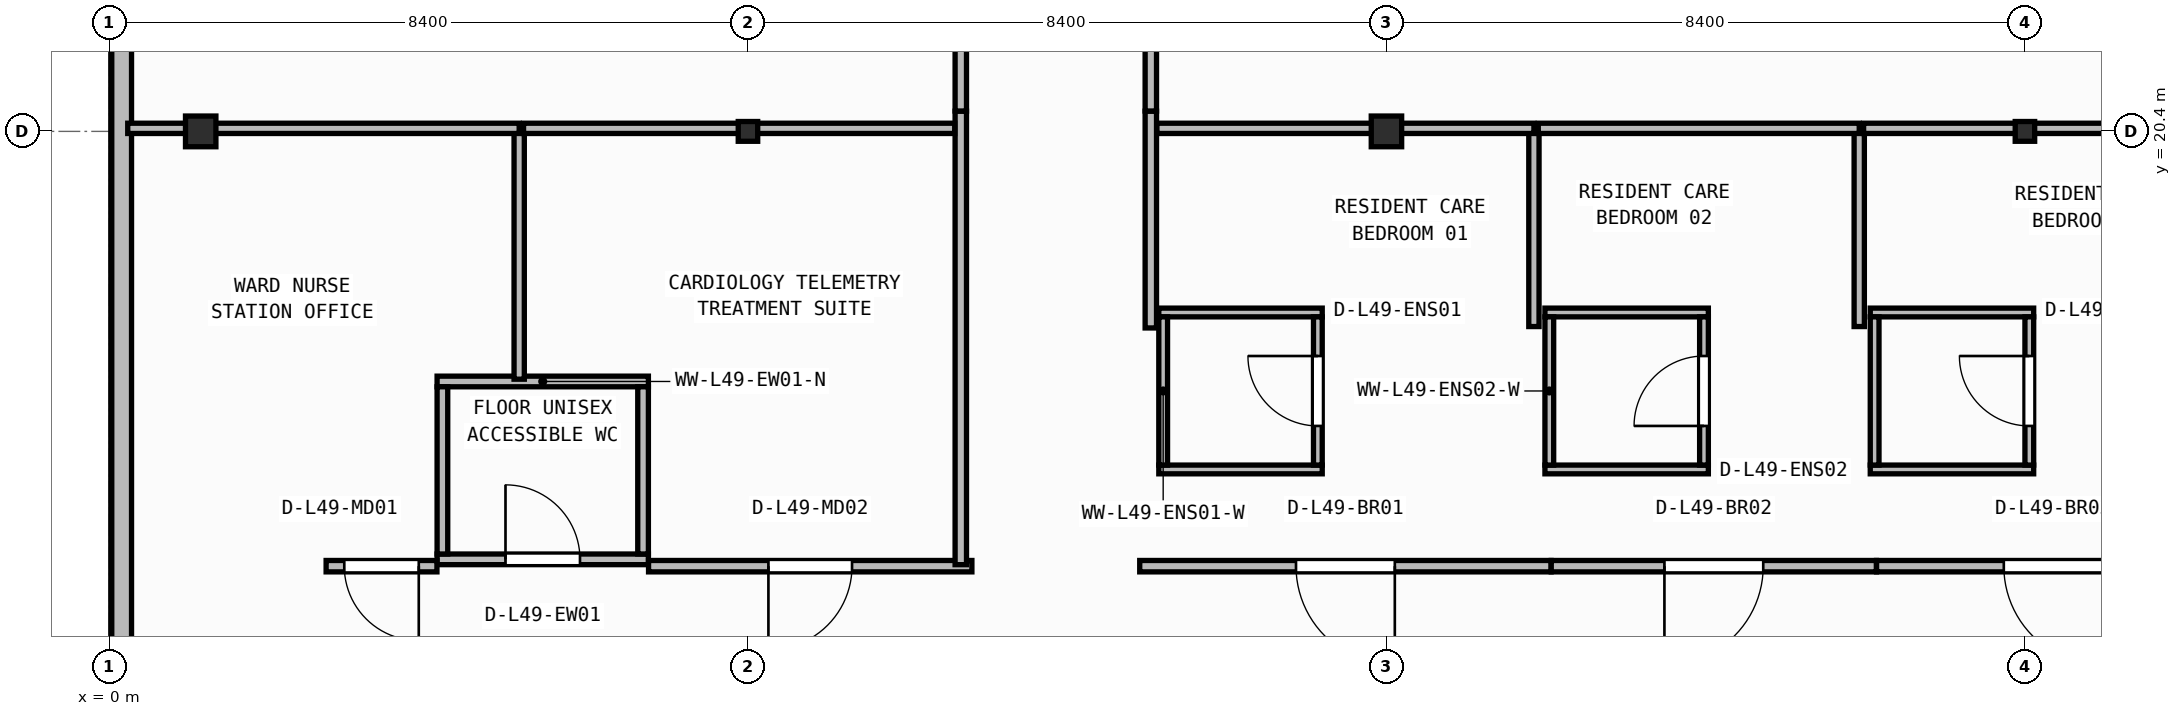
"""IFC4 building model, lengths in metres.
Left out: names, types, materials, properties, quantities, classifications, styles, units other than length and angle.
Written with IfcOpenShell. Run it as: python <this file> out.ifc"""

import sys

from ifc_helpers import new_model, si_unit, direction, frame, frame_2d, origin, origin_2d, place, context, subcontext, project, spatial, rectangle, i_section, extrude, element, fill, save


model = new_model("IFC4")
c1 = context("Model", 3, precision=1e-05, world=origin(), true_north=direction((0.0, 1.0)))
c2 = subcontext(c1, "Body", "Model", "MODEL_VIEW")
j1 = project(units=[si_unit("LENGTHUNIT", "METRE"), si_unit("PLANEANGLEUNIT", "RADIAN")], contexts=[c1])
p1 = place(None, origin())
s1 = spatial("IfcSite", under=j1, at=p1, CompositionType="ELEMENT")
p2 = place(p1, origin())
s2 = spatial("IfcBuilding", under=s1, at=p2, CompositionType="ELEMENT")
p3 = place(p2, frame((0.0, 0.0, 200.0)))
s3 = spatial("IfcBuildingStorey", under=s2, at=p3, CompositionType="ELEMENT", Elevation=200.0)
p4 = place(p3, frame((1.2, 20.4, 0.0), z_axis=(0.0, 0.0, 1.0), x_axis=(1.0, 0.0, 0.0)))
e1 = element("IfcColumn", 1, at=p4, inside=s3, PredefinedType="COLUMN", context=c2, shape_type="SweptSolid", body=[
    extrude(i_section(OverallWidth=0.4, OverallDepth=0.404, WebThickness=0.02, FlangeThickness=0.032, at=origin_2d()), origin(), (0.0, 0.0, 1.0), 3.95),
])
p5 = place(p3, frame((8.4, 20.4, 0.0), z_axis=(0.0, 0.0, 1.0), x_axis=(1.0, 0.0, 0.0)))
e2 = element("IfcColumn", 2, at=p5, inside=s3, PredefinedType="COLUMN", context=c2, shape_type="SweptSolid", body=[
    extrude(i_section(OverallWidth=0.256, OverallDepth=0.26, WebThickness=0.01, FlangeThickness=0.017, FilletRadius=0.013, at=origin_2d()), origin(), (0.0, 0.0, 1.0), 3.95),
])
p6 = place(p3, frame((16.8, 20.4, 0.0), z_axis=(0.0, 0.0, 1.0), x_axis=(1.0, 0.0, 0.0)))
e3 = element("IfcColumn", 3, at=p6, inside=s3, PredefinedType="COLUMN", context=c2, shape_type="SweptSolid", body=[
    extrude(i_section(OverallWidth=0.4, OverallDepth=0.404, WebThickness=0.02, FlangeThickness=0.032, at=origin_2d()), origin(), (0.0, 0.0, 1.0), 3.95),
])
p7 = place(p3, frame((25.2, 20.4, 0.0), z_axis=(0.0, 0.0, 1.0), x_axis=(1.0, 0.0, 0.0)))
e4 = element("IfcColumn", 4, at=p7, inside=s3, PredefinedType="COLUMN", context=c2, shape_type="SweptSolid", body=[
    extrude(i_section(OverallWidth=0.256, OverallDepth=0.26, WebThickness=0.01, FlangeThickness=0.017, FilletRadius=0.013, at=origin_2d()), origin(), (0.0, 0.0, 1.0), 3.95),
])
p8 = place(p3, frame((0.16, 40.14, 0.0), z_axis=(0.0, 0.0, 1.0), x_axis=(0.0, -1.0, 0.0)))
e5 = element("IfcWall", 5, at=p8, inside=s3, PredefinedType="STANDARD", context=c2, shape_type="SweptSolid", body=[
    extrude(rectangle(XDim=37.48, YDim=0.26, at=frame_2d((18.74, 0.0))), origin(), (0.0, 0.0, 1.0), 3.71),
])
p9 = place(p8, frame((27.4, 0.0, 0.9)))
e6 = element("IfcOpeningElement", 6, at=p9, cuts=e5, PredefinedType="OPENING", context=c2, shape_type="SweptSolid", body=[
    extrude(rectangle(XDim=2.4, YDim=1.65, at=frame_2d((1.2, 0.825))), frame((0.0, 0.14, 0.0), z_axis=(0.0, -1.0, 0.0), x_axis=(1.0, 0.0, 0.0)), (0.0, 0.0, 1.0), 0.28),
])
p10 = place(p3, frame((4.31, 14.77, 0.0), z_axis=(0.0, 0.0, 1.0), x_axis=(1.0, 0.0, 0.0)))
e7 = element("IfcWall", 7, at=p10, inside=s3, PredefinedType="PARTITIONING", context=c2, shape_type="SweptSolid", body=[
    extrude(rectangle(XDim=2.78, YDim=0.14, at=frame_2d((1.39, 0.0))), origin(), (0.0, 0.0, 1.0), 3.71),
])
p11 = place(p10, frame((0.9, 0.0, 0.0)))
e8 = element("IfcOpeningElement", 8, at=p11, cuts=e7, PredefinedType="OPENING", context=c2, shape_type="SweptSolid", body=[
    extrude(rectangle(XDim=0.98, YDim=2.1, at=frame_2d((0.49, 1.05))), frame((0.0, 0.08, 0.0), z_axis=(0.0, -1.0, 0.0), x_axis=(1.0, 0.0, 0.0)), (0.0, 0.0, 1.0), 0.16),
])
p12 = place(p3, frame((4.31, 17.11, 0.0), z_axis=(0.0, 0.0, 1.0), x_axis=(1.0, 0.0, 0.0)))
e9 = element("IfcWall", 9, at=p12, inside=s3, PredefinedType="PARTITIONING", context=c2, shape_type="SweptSolid", body=[
    extrude(rectangle(XDim=2.78, YDim=0.14, at=frame_2d((1.39, 0.0))), origin(), (0.0, 0.0, 1.0), 3.71),
])
for number, where, z_axis, x_axis in (
    (10, (4.38, 14.84, 0.0), (0.0, 0.0, 1.0), (0.0, 1.0, 0.0)),
    (11, (7.02, 14.84, 0.0), (0.0, 0.0, 1.0), (0.0, 1.0, 0.0)),
):
    element("IfcWall", number, at=place(p3, frame(where, z_axis=z_axis, x_axis=x_axis)), inside=s3, PredefinedType="PARTITIONING", context=c2, shape_type="SweptSolid", body=[
        extrude(rectangle(XDim=2.2, YDim=0.14, at=frame_2d((1.1, 0.0))), origin(), (0.0, 0.0, 1.0), 3.71),
    ])
for number, where, z_axis, x_axis in (
    (12, (13.805, 15.952, 0.0), (0.0, 0.0, 1.0), (1.0, 0.0, 0.0)),
    (13, (13.805, 18.018, 0.0), (0.0, 0.0, 1.0), (1.0, 0.0, 0.0)),
):
    element("IfcWall", number, at=place(p3, frame(where, z_axis=z_axis, x_axis=x_axis)), inside=s3, PredefinedType="PARTITIONING", context=c2, shape_type="SweptSolid", body=[
        extrude(rectangle(XDim=2.15, YDim=0.115, at=frame_2d((1.075, 0.0))), origin(), (0.0, 0.0, 1.0), 3.71),
    ])
p13 = place(p3, frame((13.863, 16.01, 0.0), z_axis=(0.0, 0.0, 1.0), x_axis=(0.0, 1.0, 0.0)))
e14 = element("IfcWall", 14, at=p13, inside=s3, PredefinedType="PARTITIONING", context=c2, shape_type="SweptSolid", body=[
    extrude(rectangle(XDim=1.95, YDim=0.115, at=frame_2d((0.975, 0.0))), origin(), (0.0, 0.0, 1.0), 3.71),
])
p14 = place(p3, frame((15.897, 16.01, 0.0), z_axis=(0.0, 0.0, 1.0), x_axis=(0.0, 1.0, 0.0)))
e15 = element("IfcWall", 15, at=p14, inside=s3, PredefinedType="PARTITIONING", context=c2, shape_type="SweptSolid", body=[
    extrude(rectangle(XDim=1.95, YDim=0.115, at=frame_2d((0.975, 0.0))), origin(), (0.0, 0.0, 1.0), 3.71),
])
p15 = place(p14, frame((0.515, 0.0, 0.0)))
e16 = element("IfcOpeningElement", 16, at=p15, cuts=e15, PredefinedType="OPENING", context=c2, shape_type="SweptSolid", body=[
    extrude(rectangle(XDim=0.92, YDim=2.1, at=frame_2d((0.46, 1.05))), frame((0.0, 0.067, 0.0), z_axis=(0.0, -1.0, 0.0), x_axis=(1.0, 0.0, 0.0)), (0.0, 0.0, 1.0), 0.135),
])
for number, where, z_axis, x_axis in (
    (17, (18.885, 15.952, 0.0), (0.0, 0.0, 1.0), (1.0, 0.0, 0.0)),
    (18, (18.885, 18.018, 0.0), (0.0, 0.0, 1.0), (1.0, 0.0, 0.0)),
):
    element("IfcWall", number, at=place(p3, frame(where, z_axis=z_axis, x_axis=x_axis)), inside=s3, PredefinedType="PARTITIONING", context=c2, shape_type="SweptSolid", body=[
        extrude(rectangle(XDim=2.15, YDim=0.115, at=frame_2d((1.075, 0.0))), origin(), (0.0, 0.0, 1.0), 3.71),
    ])
p16 = place(p3, frame((18.942, 16.01, 0.0), z_axis=(0.0, 0.0, 1.0), x_axis=(0.0, 1.0, 0.0)))
e19 = element("IfcWall", 19, at=p16, inside=s3, PredefinedType="PARTITIONING", context=c2, shape_type="SweptSolid", body=[
    extrude(rectangle(XDim=1.95, YDim=0.115, at=frame_2d((0.975, 0.0))), origin(), (0.0, 0.0, 1.0), 3.71),
])
p17 = place(p3, frame((20.978, 16.01, 0.0), z_axis=(0.0, 0.0, 1.0), x_axis=(0.0, 1.0, 0.0)))
e20 = element("IfcWall", 20, at=p17, inside=s3, PredefinedType="PARTITIONING", context=c2, shape_type="SweptSolid", body=[
    extrude(rectangle(XDim=1.95, YDim=0.115, at=frame_2d((0.975, 0.0))), origin(), (0.0, 0.0, 1.0), 3.71),
])
p18 = place(p17, frame((0.515, 0.0, 0.0)))
e21 = element("IfcOpeningElement", 21, at=p18, cuts=e20, PredefinedType="OPENING", context=c2, shape_type="SweptSolid", body=[
    extrude(rectangle(XDim=0.92, YDim=2.1, at=frame_2d((0.46, 1.05))), frame((0.0, 0.067, 0.0), z_axis=(0.0, -1.0, 0.0), x_axis=(1.0, 0.0, 0.0)), (0.0, 0.0, 1.0), 0.135),
])
p19 = place(p3, frame((23.165, 15.952, 0.0), z_axis=(0.0, 0.0, 1.0), x_axis=(1.0, 0.0, 0.0)))
e22 = element("IfcWall", 22, at=p19, inside=s3, PredefinedType="PARTITIONING", context=c2, shape_type="SweptSolid", body=[
    extrude(rectangle(XDim=2.15, YDim=0.115, at=frame_2d((1.075, 0.0))), origin(), (0.0, 0.0, 1.0), 3.429),
])
p20 = place(p3, frame((23.165, 18.018, 0.0), z_axis=(0.0, 0.0, 1.0), x_axis=(1.0, 0.0, 0.0)))
e23 = element("IfcWall", 23, at=p20, inside=s3, PredefinedType="PARTITIONING", context=c2, shape_type="SweptSolid", body=[
    extrude(rectangle(XDim=2.15, YDim=0.115, at=frame_2d((1.075, 0.0))), origin(), (0.0, 0.0, 1.0), 3.71),
])
p21 = place(p3, frame((23.222, 16.01, 0.0), z_axis=(0.0, 0.0, 1.0), x_axis=(0.0, 1.0, 0.0)))
e24 = element("IfcWall", 24, at=p21, inside=s3, PredefinedType="PARTITIONING", context=c2, shape_type="SweptSolid", body=[
    extrude(rectangle(XDim=1.95, YDim=0.115, at=frame_2d((0.975, 0.0))), origin(), (0.0, 0.0, 1.0), 3.71),
])
p22 = place(p3, frame((25.258, 16.01, 0.0), z_axis=(0.0, 0.0, 1.0), x_axis=(0.0, 1.0, 0.0)))
e25 = element("IfcWall", 25, at=p22, inside=s3, PredefinedType="PARTITIONING", context=c2, shape_type="SweptSolid", body=[
    extrude(rectangle(XDim=1.95, YDim=0.115, at=frame_2d((0.975, 0.0))), origin(), (0.0, 0.0, 1.0), 3.157),
])
p23 = place(p22, frame((0.515, 0.0, 0.0)))
e26 = element("IfcOpeningElement", 26, at=p23, cuts=e25, PredefinedType="OPENING", context=c2, shape_type="SweptSolid", body=[
    extrude(rectangle(XDim=0.92, YDim=2.1, at=frame_2d((0.46, 1.05))), frame((0.0, 0.067, 0.0), z_axis=(0.0, -1.0, 0.0), x_axis=(1.0, 0.0, 0.0)), (0.0, 0.0, 1.0), 0.135),
])
p24 = place(p3, frame((4.308, 14.68, 0.0), z_axis=(0.0, 0.0, 1.0), x_axis=(-1.0, 0.0, 0.0)))
e27 = element("IfcWall", 27, at=p24, inside=s3, PredefinedType="PARTITIONING", context=c2, shape_type="SweptSolid", body=[
    extrude(rectangle(XDim=1.458, YDim=0.15, at=frame_2d((0.729, 0.0))), origin(), (0.0, 0.0, 1.0), 3.71),
])
p25 = place(p24, frame((0.239, 0.0, 0.0)))
e28 = element("IfcOpeningElement", 28, at=p25, cuts=e27, PredefinedType="OPENING", context=c2, shape_type="SweptSolid", body=[
    extrude(rectangle(XDim=0.98, YDim=2.1, at=frame_2d((0.49, 1.05))), frame((0.0, 0.085, 0.0), z_axis=(0.0, -1.0, 0.0), x_axis=(1.0, 0.0, 0.0)), (0.0, 0.0, 1.0), 0.17),
])
p26 = place(p3, frame((11.346, 14.68, 0.0), z_axis=(0.0, 0.0, 1.0), x_axis=(-1.0, 0.0, 0.0)))
e29 = element("IfcWall", 29, at=p26, inside=s3, PredefinedType="PARTITIONING", context=c2, shape_type="SweptSolid", body=[
    extrude(rectangle(XDim=4.254, YDim=0.15, at=frame_2d((2.127, 0.0))), origin(), (0.0, 0.0, 1.0), 3.71),
])
p27 = place(p26, frame((1.577, 0.0, 0.0)))
e30 = element("IfcOpeningElement", 30, at=p27, cuts=e29, PredefinedType="OPENING", context=c2, shape_type="SweptSolid", body=[
    extrude(rectangle(XDim=1.1, YDim=2.1, at=frame_2d((0.55, 1.05))), frame((0.0, 0.085, 0.0), z_axis=(0.0, -1.0, 0.0), x_axis=(1.0, 0.0, 0.0)), (0.0, 0.0, 1.0), 0.17),
])
p28 = place(p3, frame((18.966, 14.68, 0.0), z_axis=(0.0, 0.0, 1.0), x_axis=(-1.0, 0.0, 0.0)))
e31 = element("IfcWall", 31, at=p28, inside=s3, PredefinedType="PARTITIONING", context=c2, shape_type="SweptSolid", body=[
    extrude(rectangle(XDim=5.412, YDim=0.15, at=frame_2d((2.706, 0.0))), origin(), (0.0, 0.0, 1.0), 3.71),
])
p29 = place(p28, frame((2.056, 0.0, 0.0)))
e32 = element("IfcOpeningElement", 32, at=p29, cuts=e31, PredefinedType="OPENING", context=c2, shape_type="SweptSolid", body=[
    extrude(rectangle(XDim=1.3, YDim=2.15, at=frame_2d((0.65, 1.075))), frame((0.0, 0.085, 0.0), z_axis=(0.0, -1.0, 0.0), x_axis=(1.0, 0.0, 0.0)), (0.0, 0.0, 1.0), 0.17),
])
p30 = place(p3, frame((23.246, 14.68, 0.0), z_axis=(0.0, 0.0, 1.0), x_axis=(-1.0, 0.0, 0.0)))
e33 = element("IfcWall", 33, at=p30, inside=s3, PredefinedType="PARTITIONING", context=c2, shape_type="SweptSolid", body=[
    extrude(rectangle(XDim=4.278, YDim=0.15, at=frame_2d((2.139, 0.0))), origin(), (0.0, 0.0, 1.0), 3.71),
])
p31 = place(p30, frame((1.489, 0.0, 0.0)))
e34 = element("IfcOpeningElement", 34, at=p31, cuts=e33, PredefinedType="OPENING", context=c2, shape_type="SweptSolid", body=[
    extrude(rectangle(XDim=1.3, YDim=2.15, at=frame_2d((0.65, 1.075))), frame((0.0, 0.085, 0.0), z_axis=(0.0, -1.0, 0.0), x_axis=(1.0, 0.0, 0.0)), (0.0, 0.0, 1.0), 0.17),
])
p32 = place(p3, frame((27.896, 14.68, 0.0), z_axis=(0.0, 0.0, 1.0), x_axis=(-1.0, 0.0, 0.0)))
e35 = element("IfcWall", 35, at=p32, inside=s3, PredefinedType="PARTITIONING", context=c2, shape_type="SweptSolid", body=[
    extrude(rectangle(XDim=4.648, YDim=0.15, at=frame_2d((2.324, 0.0))), origin(), (0.0, 0.0, 1.0), 3.71),
])
p33 = place(p32, frame((1.674, 0.0, 0.0)))
e36 = element("IfcOpeningElement", 36, at=p33, cuts=e35, PredefinedType="OPENING", context=c2, shape_type="SweptSolid", body=[
    extrude(rectangle(XDim=1.3, YDim=2.15, at=frame_2d((0.65, 1.075))), frame((0.0, 0.085, 0.0), z_axis=(0.0, -1.0, 0.0), x_axis=(1.0, 0.0, 0.0)), (0.0, 0.0, 1.0), 0.17),
])
p34 = place(p3, frame((11.2, 20.666, 0.0), z_axis=(0.0, 0.0, 1.0), x_axis=(0.0, -1.0, 0.0)))
e37 = element("IfcWall", 37, at=p34, inside=s3, PredefinedType="PARTITIONING", context=c2, shape_type="SweptSolid", body=[
    extrude(rectangle(XDim=5.966, YDim=0.15, at=frame_2d((2.983, 0.0))), origin(), (0.0, 0.0, 1.0), 3.71),
])
p35 = place(p3, frame((13.7, 17.814, 0.0), z_axis=(0.0, 0.0, 1.0), x_axis=(0.0, 1.0, 0.0)))
e38 = element("IfcWall", 38, at=p35, inside=s3, PredefinedType="PARTITIONING", context=c2, shape_type="SweptSolid", body=[
    extrude(rectangle(XDim=2.852, YDim=0.15, at=frame_2d((1.426, 0.0))), origin(), (0.0, 0.0, 1.0), 3.71),
])
p36 = place(p3, frame((11.2, 27.26, 0.0), z_axis=(0.0, 0.0, 1.0), x_axis=(0.0, -1.0, 0.0)))
e39 = element("IfcWall", 39, at=p36, inside=s3, PredefinedType="PARTITIONING", context=c2, shape_type="SweptSolid", body=[
    extrude(rectangle(XDim=6.592, YDim=0.15, at=frame_2d((3.296, 0.0))), origin(), (0.0, 0.0, 1.0), 3.71),
])
p37 = place(p36, frame((2.746, 0.0, 0.0)))
e40 = element("IfcOpeningElement", 40, at=p37, cuts=e39, PredefinedType="OPENING", context=c2, shape_type="SweptSolid", body=[
    extrude(rectangle(XDim=1.1, YDim=2.1, at=frame_2d((0.55, 1.05))), frame((0.0, 0.085, 0.0), z_axis=(0.0, -1.0, 0.0), x_axis=(1.0, 0.0, 0.0)), (0.0, 0.0, 1.0), 0.17),
])
p38 = place(p3, frame((13.7, 20.668, 0.0), z_axis=(0.0, 0.0, 1.0), x_axis=(0.0, 1.0, 0.0)))
e41 = element("IfcWall", 41, at=p38, inside=s3, PredefinedType="PARTITIONING", context=c2, shape_type="SweptSolid", body=[
    extrude(rectangle(XDim=6.592, YDim=0.15, at=frame_2d((3.296, 0.0))), origin(), (0.0, 0.0, 1.0), 3.71),
])
p39 = place(p38, frame((2.746, 0.0, 0.0)))
e42 = element("IfcOpeningElement", 42, at=p39, cuts=e41, PredefinedType="OPENING", context=c2, shape_type="SweptSolid", body=[
    extrude(rectangle(XDim=1.1, YDim=2.1, at=frame_2d((0.55, 1.05))), frame((0.0, 0.085, 0.0), z_axis=(0.0, -1.0, 0.0), x_axis=(1.0, 0.0, 0.0)), (0.0, 0.0, 1.0), 0.17),
])
p40 = place(p3, frame((5.39, 17.14, 0.0), z_axis=(0.0, 0.0, 1.0), x_axis=(0.0, 1.0, 0.0)))
e43 = element("IfcWall", 43, at=p40, inside=s3, PredefinedType="PARTITIONING", context=c2, shape_type="SweptSolid", body=[
    extrude(rectangle(XDim=3.3, YDim=0.135, at=frame_2d((1.65, 0.0))), origin(), (0.0, 0.0, 1.0), 3.71),
])
p41 = place(p3, frame((5.39, 20.44, 0.0), z_axis=(0.0, 0.0, 1.0), x_axis=(-1.0, 0.0, 0.0)))
e44 = element("IfcWall", 44, at=p41, inside=s3, PredefinedType="PARTITIONING", context=c2, shape_type="SweptSolid", body=[
    extrude(rectangle(XDim=5.15, YDim=0.135, at=frame_2d((2.575, 0.0))), origin(), (0.0, 0.0, 1.0), 3.152),
])
p42 = place(p3, frame((11.12, 20.44, 0.0), z_axis=(0.0, 0.0, 1.0), x_axis=(-1.0, 0.0, 0.0)))
e45 = element("IfcWall", 45, at=p42, inside=s3, PredefinedType="PARTITIONING", context=c2, shape_type="SweptSolid", body=[
    extrude(rectangle(XDim=5.673, YDim=0.135, at=frame_2d((2.836, 0.0))), origin(), (0.0, 0.0, 1.0), 3.152),
])
p43 = place(p3, frame((18.74, 17.833, 0.0), z_axis=(0.0, 0.0, 1.0), x_axis=(0.0, 1.0, 0.0)))
e46 = element("IfcWall", 46, at=p43, inside=s3, PredefinedType="PARTITIONING", context=c2, shape_type="SweptSolid", body=[
    extrude(rectangle(XDim=2.607, YDim=0.135, at=frame_2d((1.304, 0.0))), origin(), (0.0, 0.0, 1.0), 3.71),
])
p44 = place(p3, frame((18.74, 20.44, 0.0), z_axis=(0.0, 0.0, 1.0), x_axis=(-1.0, 0.0, 0.0)))
e47 = element("IfcWall", 47, at=p44, inside=s3, PredefinedType="PARTITIONING", context=c2, shape_type="SweptSolid", body=[
    extrude(rectangle(XDim=4.96, YDim=0.135, at=frame_2d((2.48, 0.0))), origin(), (0.0, 0.0, 1.0), 3.152),
])
p45 = place(p3, frame((23.02, 17.833, 0.0), z_axis=(0.0, 0.0, 1.0), x_axis=(0.0, 1.0, 0.0)))
e48 = element("IfcWall", 48, at=p45, inside=s3, PredefinedType="PARTITIONING", context=c2, shape_type="SweptSolid", body=[
    extrude(rectangle(XDim=2.607, YDim=0.135, at=frame_2d((1.304, 0.0))), origin(), (0.0, 0.0, 1.0), 3.71),
])
p46 = place(p3, frame((23.02, 20.44, 0.0), z_axis=(0.0, 0.0, 1.0), x_axis=(-1.0, 0.0, 0.0)))
e49 = element("IfcWall", 49, at=p46, inside=s3, PredefinedType="PARTITIONING", context=c2, shape_type="SweptSolid", body=[
    extrude(rectangle(XDim=4.222, YDim=0.135, at=frame_2d((2.111, 0.0))), origin(), (0.0, 0.0, 1.0), 3.152),
])
p47 = place(p3, frame((27.67, 20.44, 0.0), z_axis=(0.0, 0.0, 1.0), x_axis=(-1.0, 0.0, 0.0)))
e50 = element("IfcWall", 50, at=p47, inside=s3, PredefinedType="PARTITIONING", context=c2, shape_type="SweptSolid", body=[
    extrude(rectangle(XDim=4.593, YDim=0.135, at=frame_2d((2.296, 0.0))), origin(), (0.0, 0.0, 1.0), 3.152),
])
p48 = place(p11, origin())
e51 = element("IfcDoor", 51, at=p48, inside=s3, OperationType="SINGLE_SWING_LEFT", PredefinedType="DOOR", context=c2, shape_type="SweptSolid", body=[
    extrude(rectangle(XDim=0.98, YDim=2.1, at=frame_2d((0.49, 1.05))), frame((0.0, 0.025, 0.0), z_axis=(0.0, -1.0, 0.0), x_axis=(1.0, 0.0, 0.0)), (0.0, 0.0, 1.0), 0.05),
])
fill(e8, e51)
p49 = place(p15, origin())
e52 = element("IfcDoor", 52, at=p49, inside=s3, OperationType="SINGLE_SWING_RIGHT", PredefinedType="DOOR", context=c2, shape_type="SweptSolid", body=[
    extrude(rectangle(XDim=0.92, YDim=2.1, at=frame_2d((0.46, 1.05))), frame((0.0, 0.025, 0.0), z_axis=(0.0, -1.0, 0.0), x_axis=(1.0, 0.0, 0.0)), (0.0, 0.0, 1.0), 0.05),
])
fill(e16, e52)
p50 = place(p18, origin())
e53 = element("IfcDoor", 53, at=p50, inside=s3, OperationType="SINGLE_SWING_LEFT", PredefinedType="DOOR", context=c2, shape_type="SweptSolid", body=[
    extrude(rectangle(XDim=0.92, YDim=2.1, at=frame_2d((0.46, 1.05))), frame((0.0, 0.025, 0.0), z_axis=(0.0, -1.0, 0.0), x_axis=(1.0, 0.0, 0.0)), (0.0, 0.0, 1.0), 0.05),
])
fill(e21, e53)
p51 = place(p23, origin())
e54 = element("IfcDoor", 54, at=p51, inside=s3, OperationType="SINGLE_SWING_RIGHT", PredefinedType="DOOR", context=c2, shape_type="SweptSolid", body=[
    extrude(rectangle(XDim=0.92, YDim=2.1, at=frame_2d((0.46, 1.05))), frame((0.0, 0.025, 0.0), z_axis=(0.0, -1.0, 0.0), x_axis=(1.0, 0.0, 0.0)), (0.0, 0.0, 1.0), 0.05),
])
fill(e26, e54)
p52 = place(p25, origin())
e55 = element("IfcDoor", 55, at=p52, inside=s3, OperationType="SINGLE_SWING_LEFT", PredefinedType="DOOR", context=c2, shape_type="SweptSolid", body=[
    extrude(rectangle(XDim=0.98, YDim=2.1, at=frame_2d((0.49, 1.05))), frame((0.0, 0.025, 0.0), z_axis=(0.0, -1.0, 0.0), x_axis=(1.0, 0.0, 0.0)), (0.0, 0.0, 1.0), 0.05),
])
fill(e28, e55)
p53 = place(p27, origin())
e56 = element("IfcDoor", 56, at=p53, inside=s3, OperationType="SINGLE_SWING_RIGHT", PredefinedType="DOOR", context=c2, shape_type="SweptSolid", body=[
    extrude(rectangle(XDim=1.1, YDim=2.1, at=frame_2d((0.55, 1.05))), frame((0.0, 0.025, 0.0), z_axis=(0.0, -1.0, 0.0), x_axis=(1.0, 0.0, 0.0)), (0.0, 0.0, 1.0), 0.05),
])
fill(e30, e56)
p54 = place(p29, origin())
e57 = element("IfcDoor", 57, at=p54, inside=s3, OperationType="SINGLE_SWING_LEFT", PredefinedType="DOOR", context=c2, shape_type="SweptSolid", body=[
    extrude(rectangle(XDim=1.3, YDim=2.15, at=frame_2d((0.65, 1.075))), frame((0.0, 0.025, 0.0), z_axis=(0.0, -1.0, 0.0), x_axis=(1.0, 0.0, 0.0)), (0.0, 0.0, 1.0), 0.05),
])
fill(e32, e57)
p55 = place(p31, origin())
e58 = element("IfcDoor", 58, at=p55, inside=s3, OperationType="SINGLE_SWING_RIGHT", PredefinedType="DOOR", context=c2, shape_type="SweptSolid", body=[
    extrude(rectangle(XDim=1.3, YDim=2.15, at=frame_2d((0.65, 1.075))), frame((0.0, 0.025, 0.0), z_axis=(0.0, -1.0, 0.0), x_axis=(1.0, 0.0, 0.0)), (0.0, 0.0, 1.0), 0.05),
])
fill(e34, e58)
p56 = place(p33, origin())
e59 = element("IfcDoor", 59, at=p56, inside=s3, OperationType="SINGLE_SWING_LEFT", PredefinedType="DOOR", context=c2, shape_type="SweptSolid", body=[
    extrude(rectangle(XDim=1.3, YDim=2.15, at=frame_2d((0.65, 1.075))), frame((0.0, 0.025, 0.0), z_axis=(0.0, -1.0, 0.0), x_axis=(1.0, 0.0, 0.0)), (0.0, 0.0, 1.0), 0.05),
])
fill(e36, e59)
save(model, sys.argv[1])
